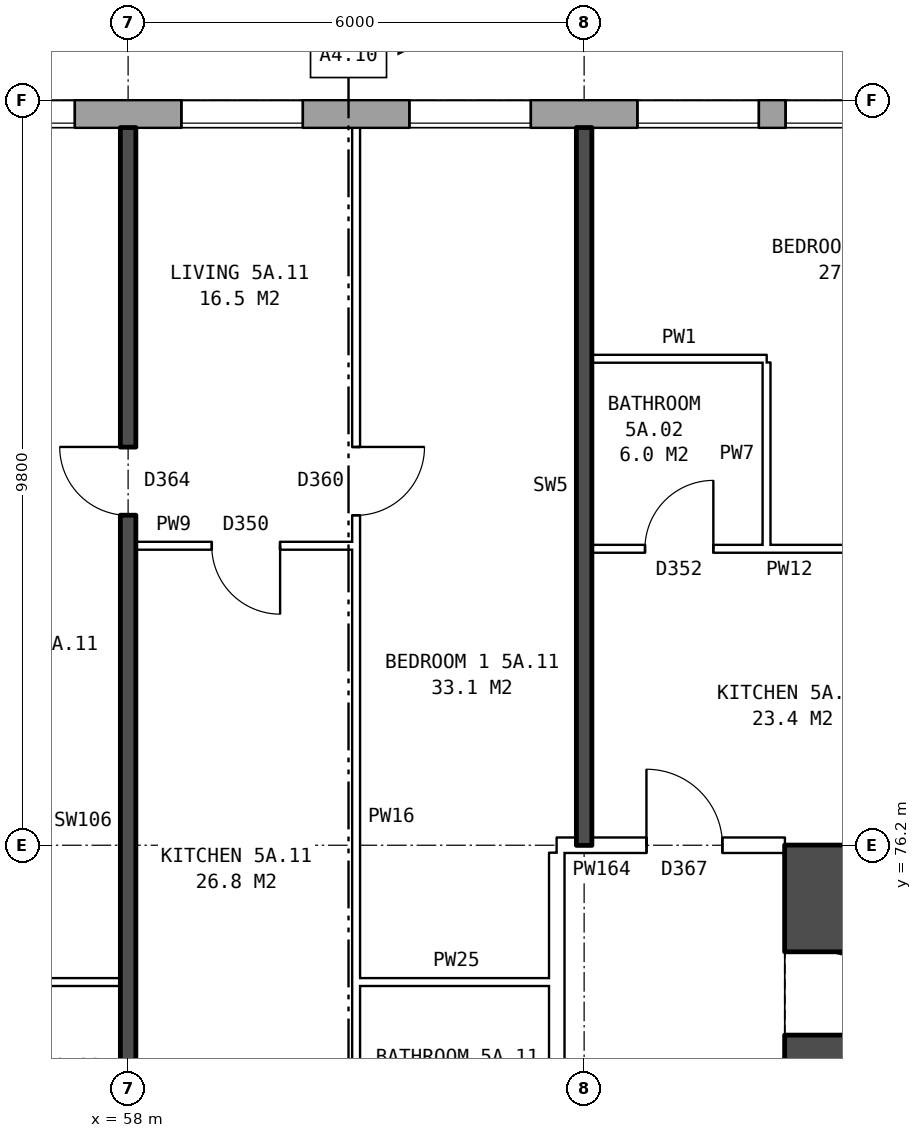
"""IFC4 building model, lengths in metres.
Left out: names, types, materials, properties, quantities, classifications, styles, units other than length and angle.
Written with IfcOpenShell. Run it as: python <this file> out.ifc"""

import sys

from ifc_helpers import new_model, si_unit, direction, frame, frame_2d, origin, place, context, subcontext, project, spatial, rectangle, extrude, element, fill, save


model = new_model("IFC4")
c1 = context("Model", 3, precision=1e-05, world=origin(), true_north=direction((0.0, 1.0)))
c2 = subcontext(c1, "Body", "Model", "MODEL_VIEW")
j1 = project(units=[si_unit("LENGTHUNIT", "METRE"), si_unit("PLANEANGLEUNIT", "RADIAN")], contexts=[c1])
p1 = place(None, origin())
s1 = spatial("IfcSite", under=j1, at=p1, CompositionType="ELEMENT")
p2 = place(p1, origin())
s2 = spatial("IfcBuilding", under=s1, at=p2, CompositionType="ELEMENT")
p3 = place(p2, frame((0.0, 0.0, 22.6)))
s3 = spatial("IfcBuildingStorey", under=s2, at=p3, CompositionType="ELEMENT", Elevation=22.6)
p4 = place(p3, frame((72.925, 85.82, 0.0), z_axis=(0.0, 0.0, 1.0), x_axis=(-1.0, 0.0, 0.0)))
e1 = element("IfcWall", 1, at=p4, inside=s3, PredefinedType="STANDARD", context=c2, shape_type="SweptSolid", body=[
    extrude(rectangle(XDim=50.101, YDim=0.36, at=frame_2d((25.05, 0.0))), origin(), (0.0, 0.0, 1.0), 2.85),
])
p5 = place(p4, frame((0.625, 0.0, 0.8)))
e2 = element("IfcOpeningElement", 2, at=p5, cuts=e1, PredefinedType="OPENING", context=c2, shape_type="SweptSolid", body=[
    extrude(rectangle(XDim=1.6, YDim=1.8, at=frame_2d((0.8, 0.9))), frame((0.0, 0.19, 0.0), z_axis=(0.0, -1.0, 0.0), x_axis=(1.0, 0.0, 0.0)), (0.0, 0.0, 1.0), 0.38),
])
p6 = place(p4, frame((3.125, 0.0, 1.7)))
e3 = element("IfcOpeningElement", 3, at=p6, cuts=e1, PredefinedType="OPENING", context=c2, shape_type="SweptSolid", body=[
    extrude(rectangle(XDim=0.8, YDim=0.9, at=frame_2d((0.4, 0.45))), frame((0.0, 0.19, 0.0), z_axis=(0.0, -1.0, 0.0), x_axis=(1.0, 0.0, 0.0)), (0.0, 0.0, 1.0), 0.38),
])
p7 = place(p4, frame((6.625, 0.0, 0.8)))
e4 = element("IfcOpeningElement", 4, at=p7, cuts=e1, PredefinedType="OPENING", context=c2, shape_type="SweptSolid", body=[
    extrude(rectangle(XDim=1.6, YDim=1.8, at=frame_2d((0.8, 0.9))), frame((0.0, 0.19, 0.0), z_axis=(0.0, -1.0, 0.0), x_axis=(1.0, 0.0, 0.0)), (0.0, 0.0, 1.0), 0.38),
])
p8 = place(p4, frame((9.625, 0.0, 0.8)))
e5 = element("IfcOpeningElement", 5, at=p8, cuts=e1, PredefinedType="OPENING", context=c2, shape_type="SweptSolid", body=[
    extrude(rectangle(XDim=1.6, YDim=1.8, at=frame_2d((0.8, 0.9))), frame((0.0, 0.19, 0.0), z_axis=(0.0, -1.0, 0.0), x_axis=(1.0, 0.0, 0.0)), (0.0, 0.0, 1.0), 0.38),
])
p9 = place(p4, frame((12.625, 0.0, 0.8)))
e6 = element("IfcOpeningElement", 6, at=p9, cuts=e1, PredefinedType="OPENING", context=c2, shape_type="SweptSolid", body=[
    extrude(rectangle(XDim=1.6, YDim=1.8, at=frame_2d((0.8, 0.9))), frame((0.0, 0.19, 0.0), z_axis=(0.0, -1.0, 0.0), x_axis=(1.0, 0.0, 0.0)), (0.0, 0.0, 1.0), 0.38),
])
p10 = place(p4, frame((15.625, 0.0, 0.8)))
e7 = element("IfcOpeningElement", 7, at=p10, cuts=e1, PredefinedType="OPENING", context=c2, shape_type="SweptSolid", body=[
    extrude(rectangle(XDim=1.6, YDim=1.8, at=frame_2d((0.8, 0.9))), frame((0.0, 0.19, 0.0), z_axis=(0.0, -1.0, 0.0), x_axis=(1.0, 0.0, 0.0)), (0.0, 0.0, 1.0), 0.38),
])
p11 = place(p4, frame((18.625, 0.0, 0.8)))
e8 = element("IfcOpeningElement", 8, at=p11, cuts=e1, PredefinedType="OPENING", context=c2, shape_type="SweptSolid", body=[
    extrude(rectangle(XDim=1.6, YDim=1.8, at=frame_2d((0.8, 0.9))), frame((0.0, 0.19, 0.0), z_axis=(0.0, -1.0, 0.0), x_axis=(1.0, 0.0, 0.0)), (0.0, 0.0, 1.0), 0.38),
])
p12 = place(p4, frame((21.625, 0.0, 0.8)))
e9 = element("IfcOpeningElement", 9, at=p12, cuts=e1, PredefinedType="OPENING", context=c2, shape_type="SweptSolid", body=[
    extrude(rectangle(XDim=1.6, YDim=1.8, at=frame_2d((0.8, 0.9))), frame((0.0, 0.19, 0.0), z_axis=(0.0, -1.0, 0.0), x_axis=(1.0, 0.0, 0.0)), (0.0, 0.0, 1.0), 0.38),
])
p13 = place(p4, frame((24.625, 0.0, 0.8)))
e10 = element("IfcOpeningElement", 10, at=p13, cuts=e1, PredefinedType="OPENING", context=c2, shape_type="SweptSolid", body=[
    extrude(rectangle(XDim=1.6, YDim=1.8, at=frame_2d((0.8, 0.9))), frame((0.0, 0.19, 0.0), z_axis=(0.0, -1.0, 0.0), x_axis=(1.0, 0.0, 0.0)), (0.0, 0.0, 1.0), 0.38),
])
p14 = place(p4, frame((27.625, 0.0, 0.8)))
e11 = element("IfcOpeningElement", 11, at=p14, cuts=e1, PredefinedType="OPENING", context=c2, shape_type="SweptSolid", body=[
    extrude(rectangle(XDim=1.6, YDim=1.8, at=frame_2d((0.8, 0.9))), frame((0.0, 0.19, 0.0), z_axis=(0.0, -1.0, 0.0), x_axis=(1.0, 0.0, 0.0)), (0.0, 0.0, 1.0), 0.38),
])
p15 = place(p4, frame((30.625, 0.0, 0.8)))
e12 = element("IfcOpeningElement", 12, at=p15, cuts=e1, PredefinedType="OPENING", context=c2, shape_type="SweptSolid", body=[
    extrude(rectangle(XDim=1.6, YDim=1.8, at=frame_2d((0.8, 0.9))), frame((0.0, 0.19, 0.0), z_axis=(0.0, -1.0, 0.0), x_axis=(1.0, 0.0, 0.0)), (0.0, 0.0, 1.0), 0.38),
])
p16 = place(p4, frame((33.625, 0.0, 0.8)))
e13 = element("IfcOpeningElement", 13, at=p16, cuts=e1, PredefinedType="OPENING", context=c2, shape_type="SweptSolid", body=[
    extrude(rectangle(XDim=1.6, YDim=1.8, at=frame_2d((0.8, 0.9))), frame((0.0, 0.19, 0.0), z_axis=(0.0, -1.0, 0.0), x_axis=(1.0, 0.0, 0.0)), (0.0, 0.0, 1.0), 0.38),
])
p17 = place(p4, frame((36.625, 0.0, 0.8)))
e14 = element("IfcOpeningElement", 14, at=p17, cuts=e1, PredefinedType="OPENING", context=c2, shape_type="SweptSolid", body=[
    extrude(rectangle(XDim=1.6, YDim=1.8, at=frame_2d((0.8, 0.9))), frame((0.0, 0.19, 0.0), z_axis=(0.0, -1.0, 0.0), x_axis=(1.0, 0.0, 0.0)), (0.0, 0.0, 1.0), 0.38),
])
p18 = place(p4, frame((39.625, 0.0, 0.8)))
e15 = element("IfcOpeningElement", 15, at=p18, cuts=e1, PredefinedType="OPENING", context=c2, shape_type="SweptSolid", body=[
    extrude(rectangle(XDim=1.6, YDim=1.8, at=frame_2d((0.8, 0.9))), frame((0.0, 0.19, 0.0), z_axis=(0.0, -1.0, 0.0), x_axis=(1.0, 0.0, 0.0)), (0.0, 0.0, 1.0), 0.38),
])
p19 = place(p4, frame((41.525, 0.0, 0.8)))
e16 = element("IfcOpeningElement", 16, at=p19, cuts=e1, PredefinedType="OPENING", context=c2, shape_type="SweptSolid", body=[
    extrude(rectangle(XDim=1.6, YDim=1.8, at=frame_2d((0.8, 0.9))), frame((0.0, 0.19, 0.0), z_axis=(0.0, -1.0, 0.0), x_axis=(1.0, 0.0, 0.0)), (0.0, 0.0, 1.0), 0.38),
])
p20 = place(p4, frame((46.525, 0.0, 1.4)))
e17 = element("IfcOpeningElement", 17, at=p20, cuts=e1, PredefinedType="OPENING", context=c2, shape_type="SweptSolid", body=[
    extrude(rectangle(XDim=1.0, YDim=1.2, at=frame_2d((0.5, 0.6))), frame((0.0, 0.19, 0.0), z_axis=(0.0, -1.0, 0.0), x_axis=(1.0, 0.0, 0.0)), (0.0, 0.0, 1.0), 0.38),
])
p21 = place(p4, frame((5.475, 0.0, 0.8)))
e18 = element("IfcOpeningElement", 18, at=p21, cuts=e1, PredefinedType="OPENING", context=c2, shape_type="SweptSolid", body=[
    extrude(rectangle(XDim=0.8, YDim=0.9, at=frame_2d((0.4, 0.45))), frame((0.0, 0.19, 0.0), z_axis=(0.0, -1.0, 0.0), x_axis=(1.0, 0.0, 0.0)), (0.0, 0.0, 1.0), 0.38),
])
p22 = place(p4, frame((43.425, 0.0, 0.8)))
e19 = element("IfcOpeningElement", 19, at=p22, cuts=e1, PredefinedType="OPENING", context=c2, shape_type="SweptSolid", body=[
    extrude(rectangle(XDim=0.6, YDim=1.2, at=frame_2d((0.3, 0.6))), frame((0.0, 0.19, 0.0), z_axis=(0.0, -1.0, 0.0), x_axis=(1.0, 0.0, 0.0)), (0.0, 0.0, 1.0), 0.38),
])
p23 = place(p4, frame((47.825, 0.0, 0.8)))
e20 = element("IfcOpeningElement", 20, at=p23, cuts=e1, PredefinedType="OPENING", context=c2, shape_type="SweptSolid", body=[
    extrude(rectangle(XDim=1.4, YDim=1.8, at=frame_2d((0.7, 0.9))), frame((0.0, 0.19, 0.0), z_axis=(0.0, -1.0, 0.0), x_axis=(1.0, 0.0, 0.0)), (0.0, 0.0, 1.0), 0.38),
])
p24 = place(p3, frame((67.09, 64.7, 0.0), z_axis=(0.0, 0.0, 1.0), x_axis=(0.0, 1.0, 0.0)))
e21 = element("IfcWall", 21, at=p24, inside=s3, PredefinedType="SHEAR", context=c2, shape_type="SweptSolid", body=[
    extrude(rectangle(XDim=10.6, YDim=0.9, at=frame_2d((5.3, 0.0))), origin(), (0.0, 0.0, 1.0), 2.85),
])
p25 = place(p24, frame((0.425, 0.0, 0.0)))
e22 = element("IfcOpeningElement", 22, at=p25, cuts=e21, PredefinedType="OPENING", context=c2, shape_type="SweptSolid", body=[
    extrude(rectangle(XDim=1.1, YDim=2.1, at=frame_2d((0.55, 1.05))), frame((0.0, 0.46, 0.0), z_axis=(0.0, -1.0, 0.0), x_axis=(1.0, 0.0, 0.0)), (0.0, 0.0, 1.0), 0.92),
])
p26 = place(p24, frame((9.0, 0.0, 0.0)))
e23 = element("IfcOpeningElement", 23, at=p26, cuts=e21, PredefinedType="OPENING", context=c2, shape_type="SweptSolid", body=[
    extrude(rectangle(XDim=1.1, YDim=2.1, at=frame_2d((0.55, 1.05))), frame((0.0, 0.46, 0.0), z_axis=(0.0, -1.0, 0.0), x_axis=(1.0, 0.0, 0.0)), (0.0, 0.0, 1.0), 0.92),
])
p27 = place(p3, frame((66.64, 75.75, 0.0), z_axis=(0.0, 0.0, 1.0), x_axis=(1.0, 0.0, 0.0)))
e24 = element("IfcWall", 24, at=p27, inside=s3, PredefinedType="SHEAR", context=c2, shape_type="SweptSolid", body=[
    extrude(rectangle(XDim=9.0, YDim=0.9, at=frame_2d((4.5, 0.0))), origin(), (0.0, 0.0, 1.0), 2.85),
])
p28 = place(p3, frame((63.64, 63.9, 0.0), z_axis=(0.0, 0.0, 1.0), x_axis=(0.0, 1.0, 0.0)))
e25 = element("IfcWall", 25, at=p28, inside=s3, PredefinedType="PARTITIONING", context=c2, shape_type="SweptSolid", body=[
    extrude(rectangle(XDim=12.2, YDim=0.2, at=frame_2d((6.1, 0.0))), origin(), (0.0, 0.0, 1.0), 2.85),
])
p29 = place(p28, frame((5.1, 0.0, 0.0)))
e26 = element("IfcOpeningElement", 26, at=p29, cuts=e25, PredefinedType="OPENING", context=c2, shape_type="SweptSolid", body=[
    extrude(rectangle(XDim=2.0, YDim=2.1, at=frame_2d((1.0, 1.05))), frame((0.0, 0.11, 0.0), z_axis=(0.0, -1.0, 0.0), x_axis=(1.0, 0.0, 0.0)), (0.0, 0.0, 1.0), 0.22),
])
p30 = place(p3, frame((55.1, 74.4, 0.0), z_axis=(0.0, 0.0, 1.0), x_axis=(1.0, 0.0, 0.0)))
e27 = element("IfcWall", 27, at=p30, inside=s3, PredefinedType="PARTITIONING", context=c2, shape_type="SweptSolid", body=[
    extrude(rectangle(XDim=2.8, YDim=0.1, at=frame_2d((1.4, 0.0))), origin(), (0.0, 0.0, 1.0), 2.85),
])
p31 = place(p3, frame((61.0, 74.4, 0.0), z_axis=(0.0, 0.0, 1.0), x_axis=(1.0, 0.0, 0.0)))
e28 = element("IfcWall", 28, at=p31, inside=s3, PredefinedType="PARTITIONING", context=c2, shape_type="SweptSolid", body=[
    extrude(rectangle(XDim=2.64, YDim=0.1, at=frame_2d((1.32, 0.0))), origin(), (0.0, 0.0, 1.0), 2.85),
])
p32 = place(p3, frame((63.64, 76.2, 0.0), z_axis=(0.0, 0.0, 1.0), x_axis=(1.0, 0.0, 0.0)))
e29 = element("IfcWall", 29, at=p32, inside=s3, PredefinedType="PARTITIONING", context=c2, shape_type="SweptSolid", body=[
    extrude(rectangle(XDim=3.0, YDim=0.2, at=frame_2d((1.5, 0.0))), origin(), (0.0, 0.0, 1.0), 2.85),
])
p33 = place(p32, frame((1.18, 0.0, 0.0)))
e30 = element("IfcOpeningElement", 30, at=p33, cuts=e29, PredefinedType="OPENING", context=c2, shape_type="SweptSolid", body=[
    extrude(rectangle(XDim=1.0, YDim=2.1, at=frame_2d((0.5, 1.05))), frame((0.0, 0.11, 0.0), z_axis=(0.0, -1.0, 0.0), x_axis=(1.0, 0.0, 0.0)), (0.0, 0.0, 1.0), 0.22),
])
p34 = place(p3, frame((64.1, 80.1, 0.0), z_axis=(0.0, 0.0, 1.0), x_axis=(1.0, 0.0, 0.0)))
e31 = element("IfcWall", 31, at=p34, inside=s3, PredefinedType="PARTITIONING", context=c2, shape_type="SweptSolid", body=[
    extrude(rectangle(XDim=5.8, YDim=0.1, at=frame_2d((2.9, 0.0))), origin(), (0.0, 0.0, 1.0), 2.85),
])
p35 = place(p34, frame((3.6, 0.0, 0.0)))
e32 = element("IfcOpeningElement", 32, at=p35, cuts=e31, PredefinedType="OPENING", context=c2, shape_type="SweptSolid", body=[
    extrude(rectangle(XDim=0.9, YDim=2.1, at=frame_2d((0.45, 1.05))), frame((0.0, 0.06, 0.0), z_axis=(0.0, -1.0, 0.0), x_axis=(1.0, 0.0, 0.0)), (0.0, 0.0, 1.0), 0.12),
])
p36 = place(p34, frame((0.7, 0.0, 0.0)))
e33 = element("IfcOpeningElement", 33, at=p36, cuts=e31, PredefinedType="OPENING", context=c2, shape_type="SweptSolid", body=[
    extrude(rectangle(XDim=0.9, YDim=2.1, at=frame_2d((0.45, 1.05))), frame((0.0, 0.06, 0.0), z_axis=(0.0, -1.0, 0.0), x_axis=(1.0, 0.0, 0.0)), (0.0, 0.0, 1.0), 0.12),
])
p37 = place(p3, frame((58.1, 80.14, 0.0), z_axis=(0.0, 0.0, 1.0), x_axis=(1.0, 0.0, 0.0)))
e34 = element("IfcWall", 34, at=p37, inside=s3, PredefinedType="PARTITIONING", context=c2, shape_type="SweptSolid", body=[
    extrude(rectangle(XDim=2.9, YDim=0.1, at=frame_2d((1.45, 0.0))), origin(), (0.0, 0.0, 1.0), 2.85),
])
p38 = place(p37, frame((1.0, 0.0, 0.0)))
e35 = element("IfcOpeningElement", 35, at=p38, cuts=e34, PredefinedType="OPENING", context=c2, shape_type="SweptSolid", body=[
    extrude(rectangle(XDim=0.9, YDim=2.1, at=frame_2d((0.45, 1.05))), frame((0.0, 0.06, 0.0), z_axis=(0.0, -1.0, 0.0), x_axis=(1.0, 0.0, 0.0)), (0.0, 0.0, 1.0), 0.12),
])
p39 = place(p3, frame((64.1, 82.6, 0.0), z_axis=(0.0, 0.0, 1.0), x_axis=(1.0, 0.0, 0.0)))
e36 = element("IfcWall", 36, at=p39, inside=s3, PredefinedType="PARTITIONING", context=c2, shape_type="SweptSolid", body=[
    extrude(rectangle(XDim=2.3, YDim=0.1, at=frame_2d((1.15, 0.0))), origin(), (0.0, 0.0, 1.0), 2.85),
])
p40 = place(p3, frame((58.0, 71.2, 0.0), z_axis=(0.0, 0.0, 1.0), x_axis=(0.0, 1.0, 0.0)))
e37 = element("IfcWall", 37, at=p40, inside=s3, PredefinedType="SOLIDWALL", context=c2, shape_type="SweptSolid", body=[
    extrude(rectangle(XDim=14.44, YDim=0.2, at=frame_2d((7.22, 0.0))), origin(), (0.0, 0.0, 1.0), 2.85),
])
p41 = place(p40, frame((9.34, 0.0, 0.0)))
e38 = element("IfcOpeningElement", 38, at=p41, cuts=e37, PredefinedType="OPENING", context=c2, shape_type="SweptSolid", body=[
    extrude(rectangle(XDim=0.9, YDim=2.1, at=frame_2d((0.45, 1.05))), frame((0.0, 0.11, 0.0), z_axis=(0.0, -1.0, 0.0), x_axis=(1.0, 0.0, 0.0)), (0.0, 0.0, 1.0), 0.22),
])
p42 = place(p40, frame((0.4, 0.0, 0.0)))
e39 = element("IfcOpeningElement", 39, at=p42, cuts=e37, PredefinedType="OPENING", context=c2, shape_type="SweptSolid", body=[
    extrude(rectangle(XDim=0.9, YDim=2.1, at=frame_2d((0.45, 1.05))), frame((0.0, 0.11, 0.0), z_axis=(0.0, -1.0, 0.0), x_axis=(1.0, 0.0, 0.0)), (0.0, 0.0, 1.0), 0.22),
])
p43 = place(p3, frame((61.0, 71.3, 0.0), z_axis=(0.0, 0.0, 1.0), x_axis=(0.0, 1.0, 0.0)))
e40 = element("IfcWall", 40, at=p43, inside=s3, PredefinedType="PARTITIONING", context=c2, shape_type="SweptSolid", body=[
    extrude(rectangle(XDim=14.34, YDim=0.1, at=frame_2d((7.17, 0.0))), origin(), (0.0, 0.0, 1.0), 2.85),
])
p44 = place(p43, frame((9.24, 0.0, 0.0)))
e41 = element("IfcOpeningElement", 41, at=p44, cuts=e40, PredefinedType="OPENING", context=c2, shape_type="SweptSolid", body=[
    extrude(rectangle(XDim=0.9, YDim=2.1, at=frame_2d((0.45, 1.05))), frame((0.0, 0.06, 0.0), z_axis=(0.0, -1.0, 0.0), x_axis=(1.0, 0.0, 0.0)), (0.0, 0.0, 1.0), 0.12),
])
p45 = place(p43, frame((0.4, 0.0, 0.0)))
e42 = element("IfcOpeningElement", 42, at=p45, cuts=e40, PredefinedType="OPENING", context=c2, shape_type="SweptSolid", body=[
    extrude(rectangle(XDim=0.9, YDim=2.1, at=frame_2d((0.45, 1.05))), frame((0.0, 0.06, 0.0), z_axis=(0.0, -1.0, 0.0), x_axis=(1.0, 0.0, 0.0)), (0.0, 0.0, 1.0), 0.12),
])
p46 = place(p3, frame((64.0, 76.2, 0.0), z_axis=(0.0, 0.0, 1.0), x_axis=(0.0, 1.0, 0.0)))
e43 = element("IfcWall", 43, at=p46, inside=s3, PredefinedType="SOLIDWALL", context=c2, shape_type="SweptSolid", body=[
    extrude(rectangle(XDim=9.44, YDim=0.2, at=frame_2d((4.72, 0.0))), origin(), (0.0, 0.0, 1.0), 2.85),
])
p47 = place(p3, frame((66.4, 80.15, 0.0), z_axis=(0.0, 0.0, 1.0), x_axis=(0.0, 1.0, 0.0)))
e44 = element("IfcWall", 44, at=p47, inside=s3, PredefinedType="PARTITIONING", context=c2, shape_type="SweptSolid", body=[
    extrude(rectangle(XDim=2.4, YDim=0.1, at=frame_2d((1.2, 0.0))), origin(), (0.0, 0.0, 1.0), 2.85),
])
p48 = place(p7, origin())
e45 = element("IfcWindow", 45, at=p48, inside=s3, PartitioningType="SINGLE_PANEL", PredefinedType="WINDOW", context=c2, shape_type="SweptSolid", body=[
    extrude(rectangle(XDim=1.6, YDim=1.8, at=frame_2d((0.8, 0.9))), frame((0.0, 0.15, 0.0), z_axis=(0.0, -1.0, 0.0), x_axis=(1.0, 0.0, 0.0)), (0.0, 0.0, 1.0), 0.06),
])
fill(e4, e45)
p49 = place(p8, origin())
e46 = element("IfcWindow", 46, at=p49, inside=s3, PartitioningType="SINGLE_PANEL", PredefinedType="WINDOW", context=c2, shape_type="SweptSolid", body=[
    extrude(rectangle(XDim=1.6, YDim=1.8, at=frame_2d((0.8, 0.9))), frame((0.0, 0.15, 0.0), z_axis=(0.0, -1.0, 0.0), x_axis=(1.0, 0.0, 0.0)), (0.0, 0.0, 1.0), 0.06),
])
fill(e5, e46)
p50 = place(p9, origin())
e47 = element("IfcWindow", 47, at=p50, inside=s3, PartitioningType="SINGLE_PANEL", PredefinedType="WINDOW", context=c2, shape_type="SweptSolid", body=[
    extrude(rectangle(XDim=1.6, YDim=1.8, at=frame_2d((0.8, 0.9))), frame((0.0, 0.15, 0.0), z_axis=(0.0, -1.0, 0.0), x_axis=(1.0, 0.0, 0.0)), (0.0, 0.0, 1.0), 0.06),
])
fill(e6, e47)
p51 = place(p10, origin())
e48 = element("IfcWindow", 48, at=p51, inside=s3, PartitioningType="SINGLE_PANEL", PredefinedType="WINDOW", context=c2, shape_type="SweptSolid", body=[
    extrude(rectangle(XDim=1.6, YDim=1.8, at=frame_2d((0.8, 0.9))), frame((0.0, 0.15, 0.0), z_axis=(0.0, -1.0, 0.0), x_axis=(1.0, 0.0, 0.0)), (0.0, 0.0, 1.0), 0.06),
])
fill(e7, e48)
p52 = place(p33, origin())
e49 = element("IfcDoor", 49, at=p52, inside=s3, OperationType="SINGLE_SWING_LEFT", PredefinedType="DOOR", context=c2, shape_type="SweptSolid", body=[
    extrude(rectangle(XDim=1.0, YDim=2.1, at=frame_2d((0.5, 1.05))), frame((0.0, 0.025, 0.0), z_axis=(0.0, -1.0, 0.0), x_axis=(1.0, 0.0, 0.0)), (0.0, 0.0, 1.0), 0.05),
])
fill(e30, e49)
p53 = place(p36, origin())
e50 = element("IfcDoor", 50, at=p53, inside=s3, OperationType="SINGLE_SWING_RIGHT", PredefinedType="DOOR", context=c2, shape_type="SweptSolid", body=[
    extrude(rectangle(XDim=0.9, YDim=2.1, at=frame_2d((0.45, 1.05))), frame((0.0, 0.025, 0.0), z_axis=(0.0, -1.0, 0.0), x_axis=(1.0, 0.0, 0.0)), (0.0, 0.0, 1.0), 0.05),
])
fill(e33, e50)
p54 = place(p44, frame((0.9, 0.0, 0.0), z_axis=(0.0, 0.0, 1.0), x_axis=(-1.0, 0.0, 0.0)))
e51 = element("IfcDoor", 51, at=p54, inside=s3, OperationType="SINGLE_SWING_LEFT", PredefinedType="DOOR", context=c2, shape_type="SweptSolid", body=[
    extrude(rectangle(XDim=0.9, YDim=2.1, at=frame_2d((0.45, 1.05))), frame((0.0, 0.025, 0.0), z_axis=(0.0, -1.0, 0.0), x_axis=(1.0, 0.0, 0.0)), (0.0, 0.0, 1.0), 0.05),
])
fill(e41, e51)
p55 = place(p41, origin())
e52 = element("IfcDoor", 52, at=p55, inside=s3, OperationType="SINGLE_SWING_RIGHT", PredefinedType="DOOR", context=c2, shape_type="SweptSolid", body=[
    extrude(rectangle(XDim=0.9, YDim=2.1, at=frame_2d((0.45, 1.05))), frame((0.0, 0.025, 0.0), z_axis=(0.0, -1.0, 0.0), x_axis=(1.0, 0.0, 0.0)), (0.0, 0.0, 1.0), 0.05),
])
fill(e38, e52)
p56 = place(p38, frame((0.9, 0.0, 0.0), z_axis=(0.0, 0.0, 1.0), x_axis=(-1.0, 0.0, 0.0)))
e53 = element("IfcDoor", 53, at=p56, inside=s3, OperationType="SINGLE_SWING_LEFT", PredefinedType="DOOR", context=c2, shape_type="SweptSolid", body=[
    extrude(rectangle(XDim=0.9, YDim=2.1, at=frame_2d((0.45, 1.05))), frame((0.0, 0.025, 0.0), z_axis=(0.0, -1.0, 0.0), x_axis=(1.0, 0.0, 0.0)), (0.0, 0.0, 1.0), 0.05),
])
fill(e35, e53)
p57 = place(p21, origin())
e54 = element("IfcWindow", 54, at=p57, inside=s3, PartitioningType="SINGLE_PANEL", PredefinedType="WINDOW", context=c2, shape_type="SweptSolid", body=[
    extrude(rectangle(XDim=0.8, YDim=0.9, at=frame_2d((0.4, 0.45))), frame((0.0, 0.15, 0.0), z_axis=(0.0, -1.0, 0.0), x_axis=(1.0, 0.0, 0.0)), (0.0, 0.0, 1.0), 0.06),
])
fill(e18, e54)
save(model, sys.argv[1])
